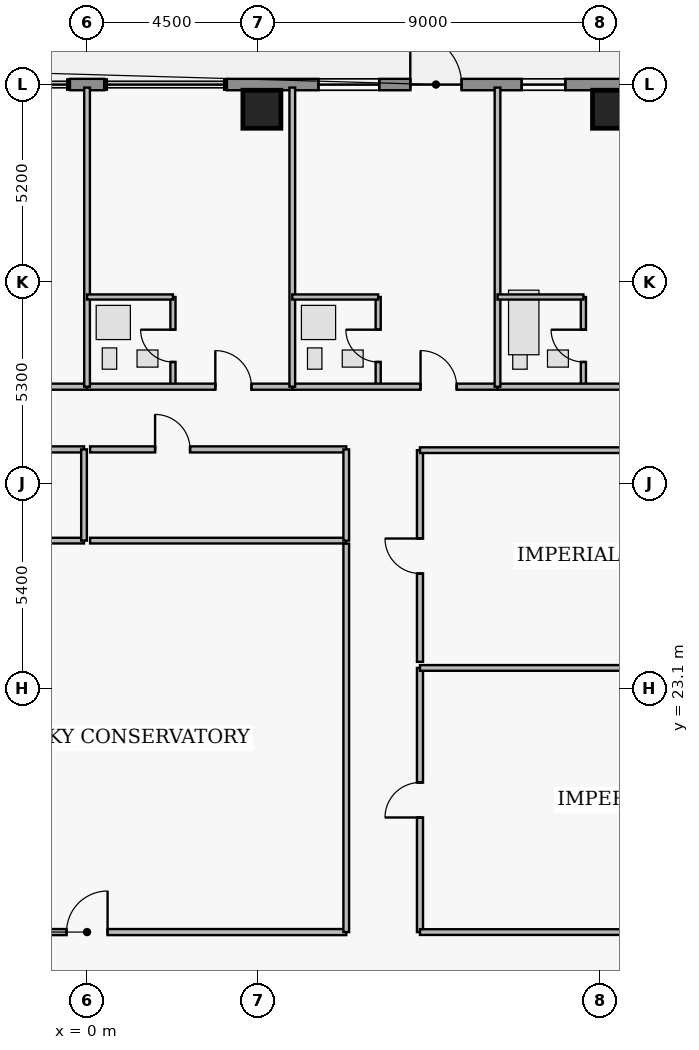
"""IFC4 building model, lengths in metres.
Left out: names, types, materials, properties, quantities, classifications, styles, units other than length and angle.
Written with IfcOpenShell. Run it as: python <this file> out.ifc"""

import sys

from ifc_helpers import new_model, si_unit, direction, frame, frame_2d, origin, origin_2d, place, context, subcontext, project, spatial, rectangle, extrude, element, fill, save


model = new_model("IFC4")
c1 = context("Model", 3, precision=1e-05, world=origin(), true_north=direction((0.0, 1.0)))
c2 = subcontext(c1, "Body", "Model", "MODEL_VIEW")
j1 = project(units=[si_unit("LENGTHUNIT", "METRE"), si_unit("PLANEANGLEUNIT", "RADIAN")], contexts=[c1])
p1 = place(None, origin())
s1 = spatial("IfcSite", under=j1, at=p1, CompositionType="ELEMENT")
p2 = place(p1, origin())
s2 = spatial("IfcBuilding", under=s1, at=p2, CompositionType="ELEMENT")
p3 = place(p2, frame((0.0, 0.0, 272.95)))
s3 = spatial("IfcBuildingStorey", under=s2, at=p3, CompositionType="ELEMENT", Elevation=272.95)
for number, where, z_axis, x_axis in (
    (1, (4.6, 38.35, 0.0), (0.0, 0.0, 1.0), (1.0, 0.0, 0.0)),
    (2, (13.8, 38.35, 0.0), (0.0, 0.0, 1.0), (1.0, 0.0, 0.0)),
):
    element("IfcColumn", number, at=place(p3, frame(where, z_axis=z_axis, x_axis=x_axis)), inside=s3, PredefinedType="COLUMN", context=c2, shape_type="SweptSolid", body=[
        extrude(rectangle(XDim=1.0, YDim=1.0, at=origin_2d()), origin(), (0.0, 0.0, 1.0), 3.7),
    ])
p4 = place(p3, frame((-0.45, 39.0, 0.0), z_axis=(0.0, 0.0, 1.0), x_axis=(1.0, 0.0, 0.0)))
e3 = element("IfcWall", 3, at=p4, inside=s3, PredefinedType="STANDARD", context=c2, shape_type="SweptSolid", body=[
    extrude(rectangle(XDim=0.9, YDim=0.3, at=frame_2d((0.45, 0.0))), origin(), (0.0, 0.0, 1.0), 3.48),
])
p5 = place(p3, frame((3.68, 39.0, 0.0), z_axis=(0.0, 0.0, 1.0), x_axis=(1.0, 0.0, 0.0)))
e4 = element("IfcWall", 4, at=p5, inside=s3, PredefinedType="STANDARD", context=c2, shape_type="SweptSolid", body=[
    extrude(rectangle(XDim=13.12, YDim=0.3, at=frame_2d((6.56, 0.0))), origin(), (0.0, 0.0, 1.0), 3.48),
])
p6 = place(p5, frame((4.825, 0.0, 0.0)))
e5 = element("IfcOpeningElement", 5, at=p6, cuts=e4, PredefinedType="OPENING", context=c2, shape_type="SweptSolid", body=[
    extrude(rectangle(XDim=1.35, YDim=2.3, at=frame_2d((0.675, 1.15))), frame((0.0, 0.16, 0.0), z_axis=(0.0, -1.0, 0.0), x_axis=(1.0, 0.0, 0.0)), (0.0, 0.0, 1.0), 0.32),
])
p7 = place(p5, frame((2.407, 0.0, 0.85)))
e6 = element("IfcOpeningElement", 6, at=p7, cuts=e4, PredefinedType="OPENING", context=c2, shape_type="SweptSolid", body=[
    extrude(rectangle(XDim=1.6, YDim=1.8, at=frame_2d((0.8, 0.9))), frame((0.0, 0.16, 0.0), z_axis=(0.0, -1.0, 0.0), x_axis=(1.0, 0.0, 0.0)), (0.0, 0.0, 1.0), 0.32),
])
p8 = place(p5, frame((7.755, 0.0, 0.95)))
e7 = element("IfcOpeningElement", 7, at=p8, cuts=e4, PredefinedType="OPENING", context=c2, shape_type="SweptSolid", body=[
    extrude(rectangle(XDim=1.15, YDim=1.55, at=frame_2d((0.575, 0.775))), frame((0.0, 0.16, 0.0), z_axis=(0.0, -1.0, 0.0), x_axis=(1.0, 0.0, 0.0)), (0.0, 0.0, 1.0), 0.32),
])
p9 = place(p5, frame((11.275, 0.0, 0.95)))
e8 = element("IfcOpeningElement", 8, at=p9, cuts=e4, PredefinedType="OPENING", context=c2, shape_type="SweptSolid", body=[
    extrude(rectangle(XDim=1.15, YDim=1.55, at=frame_2d((0.575, 0.775))), frame((0.0, 0.16, 0.0), z_axis=(0.0, -1.0, 0.0), x_axis=(1.0, 0.0, 0.0)), (0.0, 0.0, 1.0), 0.32),
])
p10 = place(p3, frame((-5.4, 31.05, 0.0), z_axis=(0.0, 0.0, 1.0), x_axis=(1.0, 0.0, 0.0)))
e9 = element("IfcWall", 9, at=p10, inside=s3, PredefinedType="PARTITIONING", context=c2, shape_type="SweptSolid", body=[
    extrude(rectangle(XDim=5.4, YDim=0.16, at=frame_2d((2.7, 0.0))), origin(), (0.0, 0.0, 1.0), 3.48),
])
p11 = place(p10, frame((3.375, 0.0, 0.0)))
e10 = element("IfcOpeningElement", 10, at=p11, cuts=e9, PredefinedType="OPENING", context=c2, shape_type="SweptSolid", body=[
    extrude(rectangle(XDim=0.95, YDim=2.15, at=frame_2d((0.475, 1.075))), frame((0.0, 0.09, 0.0), z_axis=(0.0, -1.0, 0.0), x_axis=(1.0, 0.0, 0.0)), (0.0, 0.0, 1.0), 0.18),
])
p12 = place(p3, frame((2.26, 31.05, 0.0), z_axis=(0.0, 0.0, 1.0), x_axis=(0.0, 1.0, 0.0)))
e11 = element("IfcWall", 11, at=p12, inside=s3, PredefinedType="PLUMBINGWALL", context=c2, shape_type="SweptSolid", body=[
    extrude(rectangle(XDim=2.36, YDim=0.135, at=frame_2d((1.18, 0.0))), origin(), (0.0, 0.0, 1.0), 3.48),
])
p13 = place(p12, frame((0.65, 0.0, 0.0)))
e12 = element("IfcOpeningElement", 12, at=p13, cuts=e11, PredefinedType="OPENING", context=c2, shape_type="SweptSolid", body=[
    extrude(rectangle(XDim=0.85, YDim=2.1, at=frame_2d((0.425, 1.05))), frame((0.0, 0.077, 0.0), z_axis=(0.0, -1.0, 0.0), x_axis=(1.0, 0.0, 0.0)), (0.0, 0.0, 1.0), 0.155),
])
p14 = place(p3, frame((0.0, 31.05, 0.0), z_axis=(0.0, 0.0, 1.0), x_axis=(1.0, 0.0, 0.0)))
e13 = element("IfcWall", 13, at=p14, inside=s3, PredefinedType="PARTITIONING", context=c2, shape_type="SweptSolid", body=[
    extrude(rectangle(XDim=5.4, YDim=0.16, at=frame_2d((2.7, 0.0))), origin(), (0.0, 0.0, 1.0), 3.48),
])
p15 = place(p14, frame((3.375, 0.0, 0.0)))
e14 = element("IfcOpeningElement", 14, at=p15, cuts=e13, PredefinedType="OPENING", context=c2, shape_type="SweptSolid", body=[
    extrude(rectangle(XDim=0.95, YDim=2.15, at=frame_2d((0.475, 1.075))), frame((0.0, 0.09, 0.0), z_axis=(0.0, -1.0, 0.0), x_axis=(1.0, 0.0, 0.0)), (0.0, 0.0, 1.0), 0.18),
])
p16 = place(p3, frame((7.66, 31.05, 0.0), z_axis=(0.0, 0.0, 1.0), x_axis=(0.0, 1.0, 0.0)))
e15 = element("IfcWall", 15, at=p16, inside=s3, PredefinedType="PLUMBINGWALL", context=c2, shape_type="SweptSolid", body=[
    extrude(rectangle(XDim=2.36, YDim=0.135, at=frame_2d((1.18, 0.0))), origin(), (0.0, 0.0, 1.0), 3.48),
])
p17 = place(p16, frame((0.65, 0.0, 0.0)))
e16 = element("IfcOpeningElement", 16, at=p17, cuts=e15, PredefinedType="OPENING", context=c2, shape_type="SweptSolid", body=[
    extrude(rectangle(XDim=0.85, YDim=2.1, at=frame_2d((0.425, 1.05))), frame((0.0, 0.077, 0.0), z_axis=(0.0, -1.0, 0.0), x_axis=(1.0, 0.0, 0.0)), (0.0, 0.0, 1.0), 0.155),
])
p18 = place(p3, frame((5.4, 31.05, 0.0), z_axis=(0.0, 0.0, 1.0), x_axis=(1.0, 0.0, 0.0)))
e17 = element("IfcWall", 17, at=p18, inside=s3, PredefinedType="PARTITIONING", context=c2, shape_type="SweptSolid", body=[
    extrude(rectangle(XDim=5.4, YDim=0.16, at=frame_2d((2.7, 0.0))), origin(), (0.0, 0.0, 1.0), 3.48),
])
p19 = place(p18, frame((3.375, 0.0, 0.0)))
e18 = element("IfcOpeningElement", 18, at=p19, cuts=e17, PredefinedType="OPENING", context=c2, shape_type="SweptSolid", body=[
    extrude(rectangle(XDim=0.95, YDim=2.15, at=frame_2d((0.475, 1.075))), frame((0.0, 0.09, 0.0), z_axis=(0.0, -1.0, 0.0), x_axis=(1.0, 0.0, 0.0)), (0.0, 0.0, 1.0), 0.18),
])
p20 = place(p3, frame((13.06, 31.05, 0.0), z_axis=(0.0, 0.0, 1.0), x_axis=(0.0, 1.0, 0.0)))
e19 = element("IfcWall", 19, at=p20, inside=s3, PredefinedType="PLUMBINGWALL", context=c2, shape_type="SweptSolid", body=[
    extrude(rectangle(XDim=2.36, YDim=0.135, at=frame_2d((1.18, 0.0))), origin(), (0.0, 0.0, 1.0), 3.48),
])
p21 = place(p20, frame((0.65, 0.0, 0.0)))
e20 = element("IfcOpeningElement", 20, at=p21, cuts=e19, PredefinedType="OPENING", context=c2, shape_type="SweptSolid", body=[
    extrude(rectangle(XDim=0.85, YDim=2.1, at=frame_2d((0.425, 1.05))), frame((0.0, 0.077, 0.0), z_axis=(0.0, -1.0, 0.0), x_axis=(1.0, 0.0, 0.0)), (0.0, 0.0, 1.0), 0.155),
])
p22 = place(p3, frame((10.8, 31.05, 0.0), z_axis=(0.0, 0.0, 1.0), x_axis=(1.0, 0.0, 0.0)))
e21 = element("IfcWall", 21, at=p22, inside=s3, PredefinedType="PARTITIONING", context=c2, shape_type="SweptSolid", body=[
    extrude(rectangle(XDim=9.34, YDim=0.16, at=frame_2d((4.67, 0.0))), origin(), (0.0, 0.0, 1.0), 3.48),
])
p23 = place(p22, frame((5.32, 0.0, 0.0)))
e22 = element("IfcOpeningElement", 22, at=p23, cuts=e21, PredefinedType="OPENING", context=c2, shape_type="SweptSolid", body=[
    extrude(rectangle(XDim=1.0, YDim=2.15, at=frame_2d((0.5, 1.075))), frame((0.0, 0.09, 0.0), z_axis=(0.0, -1.0, 0.0), x_axis=(1.0, 0.0, 0.0)), (0.0, 0.0, 1.0), 0.18),
])
p24 = place(p3, frame((-6.82, 29.4, 0.0), z_axis=(0.0, 0.0, 1.0), x_axis=(1.0, 0.0, 0.0)))
e23 = element("IfcWall", 23, at=p24, inside=s3, PredefinedType="PARTITIONING", context=c2, shape_type="SweptSolid", body=[
    extrude(rectangle(XDim=6.74, YDim=0.16, at=frame_2d((3.37, 0.0))), origin(), (0.0, 0.0, 1.0), 3.48),
])
p25 = place(p24, frame((4.11, 0.0, 0.0)))
e24 = element("IfcOpeningElement", 24, at=p25, cuts=e23, PredefinedType="OPENING", context=c2, shape_type="SweptSolid", body=[
    extrude(rectangle(XDim=0.92, YDim=2.12, at=frame_2d((0.46, 1.06))), frame((0.0, 0.09, 0.0), z_axis=(0.0, -1.0, 0.0), x_axis=(1.0, 0.0, 0.0)), (0.0, 0.0, 1.0), 0.18),
])
p26 = place(p3, frame((0.08, 29.4, 0.0), z_axis=(0.0, 0.0, 1.0), x_axis=(1.0, 0.0, 0.0)))
e25 = element("IfcWall", 25, at=p26, inside=s3, PredefinedType="PARTITIONING", context=c2, shape_type="SweptSolid", body=[
    extrude(rectangle(XDim=6.74, YDim=0.16, at=frame_2d((3.37, 0.0))), origin(), (0.0, 0.0, 1.0), 3.48),
])
p27 = place(p26, frame((1.71, 0.0, 0.0)))
e26 = element("IfcOpeningElement", 26, at=p27, cuts=e25, PredefinedType="OPENING", context=c2, shape_type="SweptSolid", body=[
    extrude(rectangle(XDim=0.92, YDim=2.12, at=frame_2d((0.46, 1.06))), frame((0.0, 0.09, 0.0), z_axis=(0.0, -1.0, 0.0), x_axis=(1.0, 0.0, 0.0)), (0.0, 0.0, 1.0), 0.18),
])
p28 = place(p3, frame((-6.82, 16.7, 0.0), z_axis=(0.0, 0.0, 1.0), x_axis=(1.0, 0.0, 0.0)))
e27 = element("IfcWall", 27, at=p28, inside=s3, PredefinedType="PARTITIONING", context=c2, shape_type="SweptSolid", body=[
    extrude(rectangle(XDim=13.64, YDim=0.16, at=frame_2d((6.82, 0.0))), origin(), (0.0, 0.0, 1.0), 3.076),
])
p29 = place(p28, frame((6.28, 0.0, 0.0)))
e28 = element("IfcOpeningElement", 28, at=p29, cuts=e27, PredefinedType="OPENING", context=c2, shape_type="SweptSolid", body=[
    extrude(rectangle(XDim=1.08, YDim=2.18, at=frame_2d((0.54, 1.09))), frame((0.0, 0.09, 0.0), z_axis=(0.0, -1.0, 0.0), x_axis=(1.0, 0.0, 0.0)), (0.0, 0.0, 1.0), 0.18),
])
p30 = place(p3, frame((8.76, 16.7, 0.0), z_axis=(0.0, 0.0, 1.0), x_axis=(0.0, 1.0, 0.0)))
e29 = element("IfcWall", 29, at=p30, inside=s3, PredefinedType="PARTITIONING", context=c2, shape_type="SweptSolid", body=[
    extrude(rectangle(XDim=6.95, YDim=0.16, at=frame_2d((3.475, 0.0))), origin(), (0.0, 0.0, 1.0), 3.48),
])
p31 = place(p30, frame((3.015, 0.0, 0.0)))
e30 = element("IfcOpeningElement", 30, at=p31, cuts=e29, PredefinedType="OPENING", context=c2, shape_type="SweptSolid", body=[
    extrude(rectangle(XDim=0.92, YDim=2.12, at=frame_2d((0.46, 1.06))), frame((0.0, 0.09, 0.0), z_axis=(0.0, -1.0, 0.0), x_axis=(1.0, 0.0, 0.0)), (0.0, 0.0, 1.0), 0.18),
])
p32 = place(p3, frame((8.76, 23.81, 0.0), z_axis=(0.0, 0.0, 1.0), x_axis=(0.0, 1.0, 0.0)))
e31 = element("IfcWall", 31, at=p32, inside=s3, PredefinedType="PARTITIONING", context=c2, shape_type="SweptSolid", body=[
    extrude(rectangle(XDim=5.57, YDim=0.16, at=frame_2d((2.785, 0.0))), origin(), (0.0, 0.0, 1.0), 3.48),
])
p33 = place(p32, frame((2.325, 0.0, 0.0)))
e32 = element("IfcOpeningElement", 32, at=p33, cuts=e31, PredefinedType="OPENING", context=c2, shape_type="SweptSolid", body=[
    extrude(rectangle(XDim=0.92, YDim=2.12, at=frame_2d((0.46, 1.06))), frame((0.0, 0.09, 0.0), z_axis=(0.0, -1.0, 0.0), x_axis=(1.0, 0.0, 0.0)), (0.0, 0.0, 1.0), 0.18),
])
p34 = place(p3, frame((0.0, 31.05, 0.0), z_axis=(0.0, 0.0, 1.0), x_axis=(0.0, 1.0, 0.0)))
e33 = element("IfcWall", 33, at=p34, inside=s3, PredefinedType="PARTITIONING", context=c2, shape_type="SweptSolid", body=[
    extrude(rectangle(XDim=7.87, YDim=0.15, at=frame_2d((3.935, 0.0))), origin(), (0.0, 0.0, 1.0), 3.48),
])
p35 = place(p3, frame((0.0, 33.41, 0.0), z_axis=(0.0, 0.0, 1.0), x_axis=(1.0, 0.0, 0.0)))
e34 = element("IfcWall", 34, at=p35, inside=s3, PredefinedType="PLUMBINGWALL", context=c2, shape_type="SweptSolid", body=[
    extrude(rectangle(XDim=2.26, YDim=0.135, at=frame_2d((1.13, 0.0))), origin(), (0.0, 0.0, 1.0), 3.076),
])
p36 = place(p3, frame((5.4, 31.05, 0.0), z_axis=(0.0, 0.0, 1.0), x_axis=(0.0, 1.0, 0.0)))
e35 = element("IfcWall", 35, at=p36, inside=s3, PredefinedType="PARTITIONING", context=c2, shape_type="SweptSolid", body=[
    extrude(rectangle(XDim=7.87, YDim=0.15, at=frame_2d((3.935, 0.0))), origin(), (0.0, 0.0, 1.0), 3.48),
])
p37 = place(p3, frame((5.4, 33.41, 0.0), z_axis=(0.0, 0.0, 1.0), x_axis=(1.0, 0.0, 0.0)))
e36 = element("IfcWall", 36, at=p37, inside=s3, PredefinedType="PLUMBINGWALL", context=c2, shape_type="SweptSolid", body=[
    extrude(rectangle(XDim=2.26, YDim=0.135, at=frame_2d((1.13, 0.0))), origin(), (0.0, 0.0, 1.0), 3.076),
])
p38 = place(p3, frame((10.8, 31.05, 0.0), z_axis=(0.0, 0.0, 1.0), x_axis=(0.0, 1.0, 0.0)))
e37 = element("IfcWall", 37, at=p38, inside=s3, PredefinedType="PARTITIONING", context=c2, shape_type="SweptSolid", body=[
    extrude(rectangle(XDim=7.87, YDim=0.15, at=frame_2d((3.935, 0.0))), origin(), (0.0, 0.0, 1.0), 3.48),
])
p39 = place(p3, frame((10.8, 33.41, 0.0), z_axis=(0.0, 0.0, 1.0), x_axis=(1.0, 0.0, 0.0)))
e38 = element("IfcWall", 38, at=p39, inside=s3, PredefinedType="PLUMBINGWALL", context=c2, shape_type="SweptSolid", body=[
    extrude(rectangle(XDim=2.26, YDim=0.135, at=frame_2d((1.13, 0.0))), origin(), (0.0, 0.0, 1.0), 3.076),
])
p40 = place(p3, frame((-6.82, 27.0, 0.0), z_axis=(0.0, 0.0, 1.0), x_axis=(1.0, 0.0, 0.0)))
e39 = element("IfcWall", 39, at=p40, inside=s3, PredefinedType="PARTITIONING", context=c2, shape_type="SweptSolid", body=[
    extrude(rectangle(XDim=6.74, YDim=0.15, at=frame_2d((3.37, 0.0))), origin(), (0.0, 0.0, 1.0), 3.48),
])
p41 = place(p3, frame((-0.08, 27.0, 0.0), z_axis=(0.0, 0.0, 1.0), x_axis=(0.0, 1.0, 0.0)))
e40 = element("IfcWall", 40, at=p41, inside=s3, PredefinedType="PARTITIONING", context=c2, shape_type="SweptSolid", body=[
    extrude(rectangle(XDim=2.4, YDim=0.15, at=frame_2d((1.2, 0.0))), origin(), (0.0, 0.0, 1.0), 3.48),
])
p42 = place(p3, frame((0.08, 27.0, 0.0), z_axis=(0.0, 0.0, 1.0), x_axis=(1.0, 0.0, 0.0)))
e41 = element("IfcWall", 41, at=p42, inside=s3, PredefinedType="PARTITIONING", context=c2, shape_type="SweptSolid", body=[
    extrude(rectangle(XDim=6.74, YDim=0.15, at=frame_2d((3.37, 0.0))), origin(), (0.0, 0.0, 1.0), 3.48),
])
p43 = place(p3, frame((6.82, 27.0, 0.0), z_axis=(0.0, 0.0, 1.0), x_axis=(0.0, 1.0, 0.0)))
e42 = element("IfcWall", 42, at=p43, inside=s3, PredefinedType="PARTITIONING", context=c2, shape_type="SweptSolid", body=[
    extrude(rectangle(XDim=2.4, YDim=0.15, at=frame_2d((1.2, 0.0))), origin(), (0.0, 0.0, 1.0), 3.48),
])
p44 = place(p3, frame((6.82, 16.7, 0.0), z_axis=(0.0, 0.0, 1.0), x_axis=(0.0, 1.0, 0.0)))
e43 = element("IfcWall", 43, at=p44, inside=s3, PredefinedType="PARTITIONING", context=c2, shape_type="SweptSolid", body=[
    extrude(rectangle(XDim=10.22, YDim=0.15, at=frame_2d((5.11, 0.0))), origin(), (0.0, 0.0, 1.0), 3.48),
])
p45 = place(p3, frame((8.76, 16.7, 0.0), z_axis=(0.0, 0.0, 1.0), x_axis=(1.0, 0.0, 0.0)))
e44 = element("IfcWall", 44, at=p45, inside=s3, PredefinedType="PARTITIONING", context=c2, shape_type="SweptSolid", body=[
    extrude(rectangle(XDim=12.358, YDim=0.15, at=frame_2d((6.179, 0.0))), origin(), (0.0, 0.0, 1.0), 3.076),
])
p46 = place(p3, frame((8.76, 23.65, 0.0), z_axis=(0.0, 0.0, 1.0), x_axis=(1.0, 0.0, 0.0)))
e45 = element("IfcWall", 45, at=p46, inside=s3, PredefinedType="PARTITIONING", context=c2, shape_type="SweptSolid", body=[
    extrude(rectangle(XDim=11.625, YDim=0.15, at=frame_2d((5.812, 0.0))), origin(), (0.0, 0.0, 1.0), 3.48),
])
p47 = place(p3, frame((8.76, 29.38, 0.0), z_axis=(0.0, 0.0, 1.0), x_axis=(1.0, 0.0, 0.0)))
e46 = element("IfcWall", 46, at=p47, inside=s3, PredefinedType="PARTITIONING", context=c2, shape_type="SweptSolid", body=[
    extrude(rectangle(XDim=11.38, YDim=0.15, at=frame_2d((5.69, 0.0))), origin(), (0.0, 0.0, 1.0), 3.48),
])
p48 = place(p6, origin())
e47 = element("IfcDoor", 47, at=p48, inside=s3, OperationType="SINGLE_SWING_LEFT", PredefinedType="DOOR", context=c2, shape_type="SweptSolid", body=[
    extrude(rectangle(XDim=1.35, YDim=2.3, at=frame_2d((0.675, 1.15))), frame((0.0, 0.025, 0.0), z_axis=(0.0, -1.0, 0.0), x_axis=(1.0, 0.0, 0.0)), (0.0, 0.0, 1.0), 0.05),
])
fill(e5, e47)
p49 = place(p7, origin())
e48 = element("IfcWindow", 48, at=p49, inside=s3, PartitioningType="SINGLE_PANEL", PredefinedType="WINDOW", context=c2, shape_type="SweptSolid", body=[
    extrude(rectangle(XDim=1.6, YDim=1.8, at=frame_2d((0.8, 0.9))), frame((0.0, 0.03, 0.0), z_axis=(0.0, -1.0, 0.0), x_axis=(1.0, 0.0, 0.0)), (0.0, 0.0, 1.0), 0.06),
])
fill(e6, e48)
p50 = place(p8, origin())
e49 = element("IfcWindow", 49, at=p50, inside=s3, PartitioningType="SINGLE_PANEL", PredefinedType="WINDOW", context=c2, shape_type="SweptSolid", body=[
    extrude(rectangle(XDim=1.15, YDim=1.55, at=frame_2d((0.575, 0.775))), frame((0.0, 0.03, 0.0), z_axis=(0.0, -1.0, 0.0), x_axis=(1.0, 0.0, 0.0)), (0.0, 0.0, 1.0), 0.06),
])
fill(e7, e49)
p51 = place(p13, origin())
e50 = element("IfcDoor", 50, at=p51, inside=s3, OperationType="SINGLE_SWING_RIGHT", PredefinedType="DOOR", context=c2, shape_type="SweptSolid", body=[
    extrude(rectangle(XDim=0.85, YDim=2.1, at=frame_2d((0.425, 1.05))), frame((0.0, 0.025, 0.0), z_axis=(0.0, -1.0, 0.0), x_axis=(1.0, 0.0, 0.0)), (0.0, 0.0, 1.0), 0.05),
])
fill(e12, e50)
p52 = place(p15, origin())
e51 = element("IfcDoor", 51, at=p52, inside=s3, OperationType="SINGLE_SWING_LEFT", PredefinedType="DOOR", context=c2, shape_type="SweptSolid", body=[
    extrude(rectangle(XDim=0.95, YDim=2.15, at=frame_2d((0.475, 1.075))), frame((0.0, 0.025, 0.0), z_axis=(0.0, -1.0, 0.0), x_axis=(1.0, 0.0, 0.0)), (0.0, 0.0, 1.0), 0.05),
])
fill(e14, e51)
p53 = place(p17, origin())
e52 = element("IfcDoor", 52, at=p53, inside=s3, OperationType="SINGLE_SWING_RIGHT", PredefinedType="DOOR", context=c2, shape_type="SweptSolid", body=[
    extrude(rectangle(XDim=0.85, YDim=2.1, at=frame_2d((0.425, 1.05))), frame((0.0, 0.025, 0.0), z_axis=(0.0, -1.0, 0.0), x_axis=(1.0, 0.0, 0.0)), (0.0, 0.0, 1.0), 0.05),
])
fill(e16, e52)
p54 = place(p19, origin())
e53 = element("IfcDoor", 53, at=p54, inside=s3, OperationType="SINGLE_SWING_LEFT", PredefinedType="DOOR", context=c2, shape_type="SweptSolid", body=[
    extrude(rectangle(XDim=0.95, YDim=2.15, at=frame_2d((0.475, 1.075))), frame((0.0, 0.025, 0.0), z_axis=(0.0, -1.0, 0.0), x_axis=(1.0, 0.0, 0.0)), (0.0, 0.0, 1.0), 0.05),
])
fill(e18, e53)
p55 = place(p21, origin())
e54 = element("IfcDoor", 54, at=p55, inside=s3, OperationType="SINGLE_SWING_RIGHT", PredefinedType="DOOR", context=c2, shape_type="SweptSolid", body=[
    extrude(rectangle(XDim=0.85, YDim=2.1, at=frame_2d((0.425, 1.05))), frame((0.0, 0.025, 0.0), z_axis=(0.0, -1.0, 0.0), x_axis=(1.0, 0.0, 0.0)), (0.0, 0.0, 1.0), 0.05),
])
fill(e20, e54)
p56 = place(p27, origin())
e55 = element("IfcDoor", 55, at=p56, inside=s3, OperationType="SINGLE_SWING_LEFT", PredefinedType="DOOR", context=c2, shape_type="SweptSolid", body=[
    extrude(rectangle(XDim=0.92, YDim=2.12, at=frame_2d((0.46, 1.06))), frame((0.0, 0.025, 0.0), z_axis=(0.0, -1.0, 0.0), x_axis=(1.0, 0.0, 0.0)), (0.0, 0.0, 1.0), 0.05),
])
fill(e26, e55)
p57 = place(p29, origin())
e56 = element("IfcDoor", 56, at=p57, inside=s3, OperationType="SINGLE_SWING_RIGHT", PredefinedType="DOOR", context=c2, shape_type="SweptSolid", body=[
    extrude(rectangle(XDim=1.08, YDim=2.18, at=frame_2d((0.54, 1.09))), frame((0.0, 0.025, 0.0), z_axis=(0.0, -1.0, 0.0), x_axis=(1.0, 0.0, 0.0)), (0.0, 0.0, 1.0), 0.05),
])
fill(e28, e56)
p58 = place(p31, origin())
e57 = element("IfcDoor", 57, at=p58, inside=s3, OperationType="SINGLE_SWING_LEFT", PredefinedType="DOOR", context=c2, shape_type="SweptSolid", body=[
    extrude(rectangle(XDim=0.92, YDim=2.12, at=frame_2d((0.46, 1.06))), frame((0.0, 0.025, 0.0), z_axis=(0.0, -1.0, 0.0), x_axis=(1.0, 0.0, 0.0)), (0.0, 0.0, 1.0), 0.05),
])
fill(e30, e57)
p59 = place(p33, origin())
e58 = element("IfcDoor", 58, at=p59, inside=s3, OperationType="SINGLE_SWING_RIGHT", PredefinedType="DOOR", context=c2, shape_type="SweptSolid", body=[
    extrude(rectangle(XDim=0.92, YDim=2.12, at=frame_2d((0.46, 1.06))), frame((0.0, 0.025, 0.0), z_axis=(0.0, -1.0, 0.0), x_axis=(1.0, 0.0, 0.0)), (0.0, 0.0, 1.0), 0.05),
])
fill(e32, e58)
save(model, sys.argv[1])
